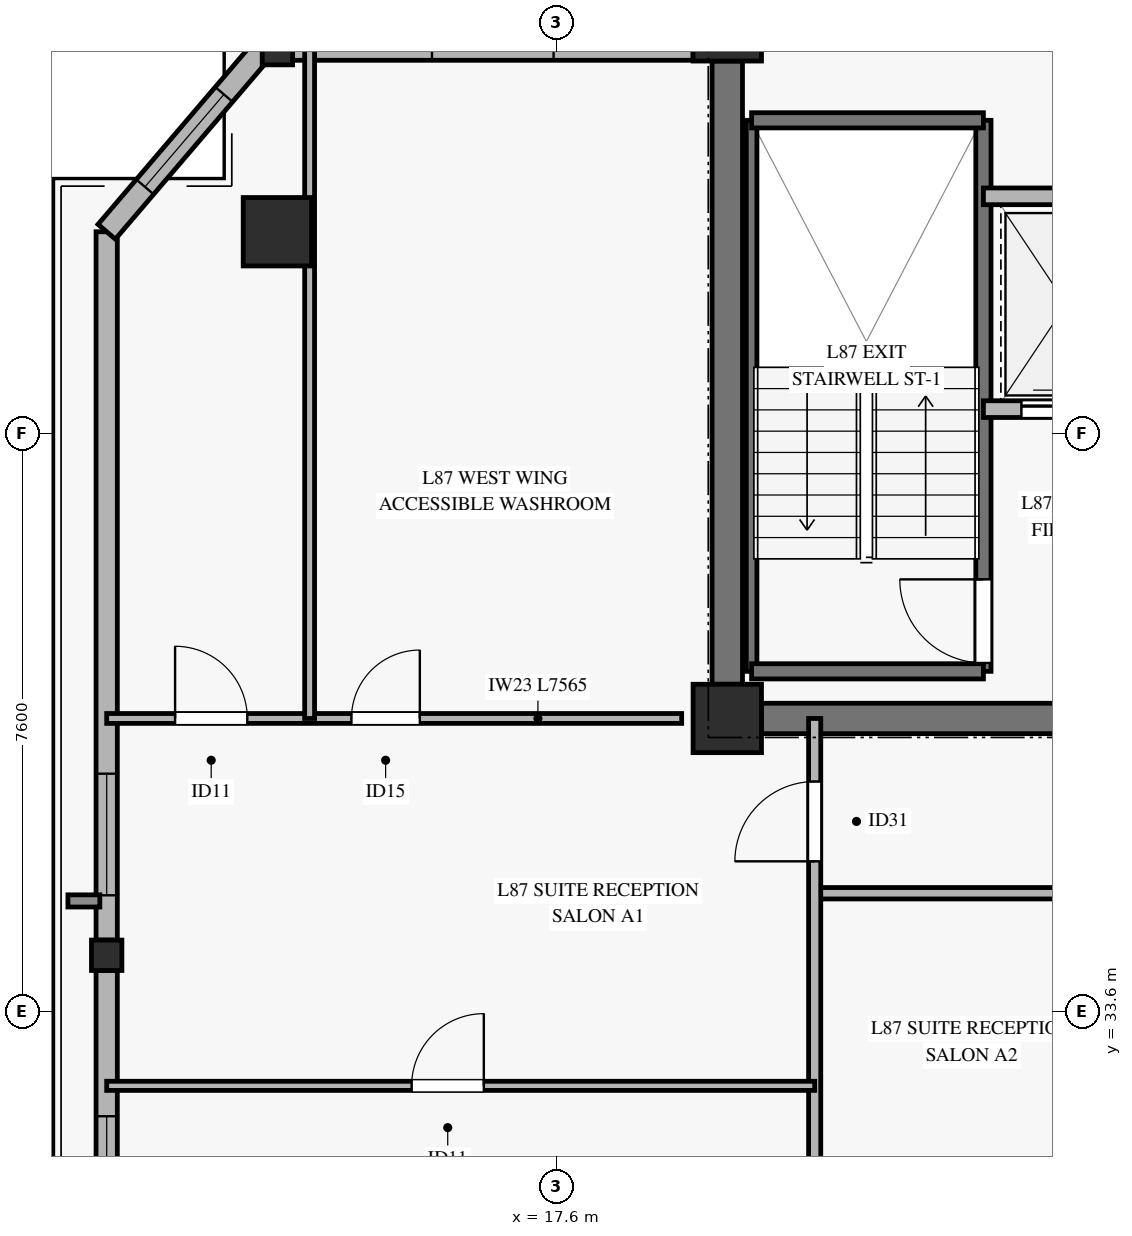
"""IFC4 building model, lengths in metres.
Left out: names, types, materials, properties, quantities, classifications, styles, units other than length and angle.
Written with IfcOpenShell. Run it as: python <this file> out.ifc"""

import sys

from ifc_helpers import new_model, si_unit, direction, frame, frame_2d, origin, origin_2d, place, context, subcontext, project, spatial, rectangle, hollow_rectangle, extrude, source, transform, mapped, element, fill, save


model = new_model("IFC4")
c1 = context("Model", 3, precision=1e-05, world=origin(), true_north=direction((0.0, 1.0)))
c2 = subcontext(c1, "Body", "Model", "MODEL_VIEW")
j1 = project(units=[si_unit("LENGTHUNIT", "METRE"), si_unit("PLANEANGLEUNIT", "RADIAN")], contexts=[c1])
p1 = place(None, origin())
s1 = spatial("IfcSite", under=j1, at=p1, CompositionType="ELEMENT")
p2 = place(p1, origin())
s2 = spatial("IfcBuilding", under=s1, at=p2, CompositionType="ELEMENT")
p3 = place(p2, frame((0.0, 0.0, 335.7)))
s3 = spatial("IfcBuildingStorey", under=s2, at=p3, CompositionType="ELEMENT", Elevation=335.7)
m1 = source(origin(), c2, "Body", "SweptSolid", [
    extrude(rectangle(XDim=0.9, YDim=0.9, at=origin_2d()), origin(), (0.0, 0.0, 1.0), 3.185),
])
for number, where, z_axis, x_axis in (
    (1, (19.85, 37.45, 0.0), (0.0, 0.0, 1.0), (1.0, 0.0, 0.0)),
    (2, (19.85, 46.55, 0.0), (0.0, 0.0, 1.0), (1.0, 0.0, 0.0)),
):
    element("IfcColumn", number, at=place(p3, frame(where, z_axis=z_axis, x_axis=x_axis)), inside=s3, PredefinedType="PILASTER", context=c2, shape_type="MappedRepresentation", body=[
        mapped(m1, transform((0.0, 0.0, 0.0), x_axis=(1.0, 0.0, 0.0), y_axis=(0.0, 1.0, 0.0), z_axis=(0.0, 0.0, 1.0), scale=1.0)),
    ])
p4 = place(p3, frame((20.3, 37.45, 0.0), z_axis=(0.0, 0.0, 1.0), x_axis=(1.0, 0.0, 0.0)))
e3 = element("IfcWall", 3, at=p4, inside=s3, PredefinedType="SHEAR", context=c2, shape_type="SweptSolid", body=[
    extrude(rectangle(XDim=10.05, YDim=0.4, at=frame_2d((5.025, 0.0))), origin(), (0.0, 0.0, 1.0), 3.185),
])
p5 = place(p4, frame((4.25, 0.0, 0.0)))
e4 = element("IfcOpeningElement", 4, at=p5, cuts=e3, PredefinedType="OPENING", context=c2, shape_type="SweptSolid", body=[
    extrude(rectangle(XDim=1.2, YDim=2.15, at=frame_2d((0.6, 1.075))), frame((0.0, 0.21, 0.0), z_axis=(0.0, -1.0, 0.0), x_axis=(1.0, 0.0, 0.0)), (0.0, 0.0, 1.0), 0.42),
])
p6 = place(p3, frame((19.85, 37.9, 0.0), z_axis=(0.0, 0.0, 1.0), x_axis=(0.0, 1.0, 0.0)))
e5 = element("IfcWall", 5, at=p6, inside=s3, PredefinedType="SHEAR", context=c2, shape_type="SweptSolid", body=[
    extrude(rectangle(XDim=8.2, YDim=0.4, at=frame_2d((4.1, 0.0))), origin(), (0.0, 0.0, 1.0), 3.185),
])
m2 = source(origin(), c2, "Body", "SweptSolid", [
    extrude(hollow_rectangle(XDim=0.9, YDim=0.9, WallThickness=0.04, at=origin_2d()), origin(), (0.0, 0.0, 1.0), 3.185),
])
p7 = place(p3, frame((13.931, 43.854, 0.0), z_axis=(0.0, 0.0, 1.0), x_axis=(1.0, 0.0, 0.0)))
e6 = element("IfcColumn", 6, at=p7, inside=s3, PredefinedType="COLUMN", context=c2, shape_type="MappedRepresentation", body=[
    mapped(m2, transform((0.0, 0.0, 0.0), x_axis=(1.0, 0.0, 0.0), y_axis=(0.0, 1.0, 0.0), z_axis=(0.0, 0.0, 1.0), scale=1.0)),
])
m3 = source(origin(), c2, "Body", "SweptSolid", [
    extrude(hollow_rectangle(XDim=0.4, YDim=0.4, WallThickness=0.02, at=origin_2d()), origin(), (0.0, 0.0, 1.0), 3.185),
])
for number, where, z_axis, x_axis in (
    (7, (11.685, 34.334, 0.0), (0.0, 0.0, 1.0), (1.0, 0.0, 0.0)),
    (8, (13.931, 46.25, 0.0), (0.0, 0.0, 1.0), (1.0, 0.0, 0.0)),
):
    element("IfcColumn", number, at=place(p3, frame(where, z_axis=z_axis, x_axis=x_axis)), inside=s3, PredefinedType="COLUMN", context=c2, shape_type="MappedRepresentation", body=[
        mapped(m3, transform((0.0, 0.0, 0.0), x_axis=(1.0, 0.0, 0.0), y_axis=(0.0, 1.0, 0.0), z_axis=(0.0, 0.0, 1.0), scale=1.0)),
    ])
p8 = place(p3, frame((11.685, 24.814, 0.0), z_axis=(0.0, 0.0, 1.0), x_axis=(0.0, 1.0, 0.0)))
e9 = element("IfcWall", 9, at=p8, inside=s3, PredefinedType="SOLIDWALL", context=c2, shape_type="SweptSolid", body=[
    extrude(rectangle(XDim=9.32, YDim=0.28, at=frame_2d((4.66, 0.0))), origin(), (0.0, 0.0, 1.0), 2.815),
])
p9 = place(p8, frame((0.604, 0.0, 0.45)))
e10 = element("IfcOpeningElement", 10, at=p9, cuts=e9, PredefinedType="OPENING", context=c2, shape_type="SweptSolid", body=[
    extrude(rectangle(XDim=1.6, YDim=2.0, at=frame_2d((0.8, 1.0))), frame((0.0, 0.15, 0.0), z_axis=(0.0, -1.0, 0.0), x_axis=(1.0, 0.0, 0.0)), (0.0, 0.0, 1.0), 0.3),
])
p10 = place(p8, frame((5.202, 0.0, 0.45)))
e11 = element("IfcOpeningElement", 11, at=p10, cuts=e9, PredefinedType="OPENING", context=c2, shape_type="SweptSolid", body=[
    extrude(rectangle(XDim=2.2, YDim=2.1, at=frame_2d((1.1, 1.05))), frame((0.0, 0.15, 0.0), z_axis=(0.0, -1.0, 0.0), x_axis=(1.0, 0.0, 0.0)), (0.0, 0.0, 1.0), 0.3),
])
p11 = place(p3, frame((11.685, 34.534, 0.0), z_axis=(0.0, 0.0, 1.0), x_axis=(0.0, 1.0, 0.0)))
e12 = element("IfcWall", 12, at=p11, inside=s3, PredefinedType="SOLIDWALL", context=c2, shape_type="SweptSolid", body=[
    extrude(rectangle(XDim=9.32, YDim=0.28, at=frame_2d((4.66, 0.0))), origin(), (0.0, 0.0, 1.0), 2.815),
])
p12 = place(p11, frame((0.589, 0.0, 0.45)))
e13 = element("IfcOpeningElement", 13, at=p12, cuts=e12, PredefinedType="OPENING", context=c2, shape_type="SweptSolid", body=[
    extrude(rectangle(XDim=1.6, YDim=2.0, at=frame_2d((0.8, 1.0))), frame((0.0, 0.15, 0.0), z_axis=(0.0, -1.0, 0.0), x_axis=(1.0, 0.0, 0.0)), (0.0, 0.0, 1.0), 0.3),
])
p13 = place(p3, frame((14.131, 46.25, 0.0), z_axis=(0.0, 0.0, 1.0), x_axis=(1.0, 0.0, 0.0)))
e14 = element("IfcWall", 14, at=p13, inside=s3, PredefinedType="SOLIDWALL", context=c2, shape_type="SweptSolid", body=[
    extrude(rectangle(XDim=5.269, YDim=0.28, at=frame_2d((2.634, 0.0))), origin(), (0.0, 0.0, 1.0), 2.815),
])
p14 = place(p13, frame((1.834, 0.0, 0.45)))
e15 = element("IfcOpeningElement", 15, at=p14, cuts=e14, PredefinedType="OPENING", context=c2, shape_type="SweptSolid", body=[
    extrude(rectangle(XDim=1.6, YDim=2.0, at=frame_2d((0.8, 1.0))), frame((0.0, 0.15, 0.0), z_axis=(0.0, -1.0, 0.0), x_axis=(1.0, 0.0, 0.0)), (0.0, 0.0, 1.0), 0.3),
])
p15 = place(p3, frame((13.731, 46.25, 0.0), z_axis=(0.0, 0.0, 1.0), x_axis=(-0.64936076944, -0.760480500153, 0.0)))
e16 = element("IfcWall", 16, at=p15, inside=s3, PredefinedType="SOLIDWALL", context=c2, shape_type="SweptSolid", body=[
    extrude(rectangle(XDim=3.151, YDim=0.3, at=frame_2d((1.575, 0.0))), origin(), (0.0, 0.0, 1.0), 2.815),
])
p16 = place(p15, frame((0.775, 0.0, 0.45)))
e17 = element("IfcOpeningElement", 17, at=p16, cuts=e16, PredefinedType="OPENING", context=c2, shape_type="SweptSolid", body=[
    extrude(rectangle(XDim=1.6, YDim=2.0, at=frame_2d((0.8, 1.0))), frame((0.0, 0.16, 0.0), z_axis=(0.0, -1.0, 0.0), x_axis=(1.0, 0.0, 0.0)), (0.0, 0.0, 1.0), 0.32),
])
p17 = place(p3, frame((20.17, 38.07, 0.0), z_axis=(0.0, 0.0, 1.0), x_axis=(0.0, 1.0, 0.0)))
e18 = element("IfcWall", 18, at=p17, inside=s3, PredefinedType="SOLIDWALL", context=c2, shape_type="SweptSolid", body=[
    extrude(rectangle(XDim=7.25, YDim=0.14, at=frame_2d((3.625, 0.0))), origin(), (0.0, 0.0, 1.0), 3.4),
])
p18 = place(p3, frame((23.22, 38.07, 0.0), z_axis=(0.0, 0.0, 1.0), x_axis=(0.0, 1.0, 0.0)))
e19 = element("IfcWall", 19, at=p18, inside=s3, PredefinedType="SOLIDWALL", context=c2, shape_type="SweptSolid", body=[
    extrude(rectangle(XDim=7.25, YDim=0.2, at=frame_2d((3.625, 0.0))), origin(), (0.0, 0.0, 1.0), 3.4),
])
p19 = place(p18, frame((0.11, 0.0, 0.0)))
e20 = element("IfcOpeningElement", 20, at=p19, cuts=e19, PredefinedType="OPENING", context=c2, shape_type="SweptSolid", body=[
    extrude(rectangle(XDim=1.1, YDim=2.15, at=frame_2d((0.55, 1.075))), frame((0.0, 0.11, 0.0), z_axis=(0.0, -1.0, 0.0), x_axis=(1.0, 0.0, 0.0)), (0.0, 0.0, 1.0), 0.22),
])
for number, where, z_axis, x_axis in (
    (21, (20.17, 45.32, 0.0), (0.0, 0.0, 1.0), (1.0, 0.0, 0.0)),
    (22, (20.17, 38.07, 0.0), (0.0, 0.0, 1.0), (1.0, 0.0, 0.0)),
):
    element("IfcWall", number, at=place(p3, frame(where, z_axis=z_axis, x_axis=x_axis)), inside=s3, PredefinedType="SOLIDWALL", context=c2, shape_type="SweptSolid", body=[
        extrude(rectangle(XDim=3.05, YDim=0.2, at=frame_2d((1.525, 0.0))), origin(), (0.0, 0.0, 1.0), 3.4),
    ])
p20 = place(p3, frame((23.22, 41.52, 0.0), z_axis=(0.0, 0.0, 1.0), x_axis=(1.0, 0.0, 0.0)))
e23 = element("IfcWall", 23, at=p20, inside=s3, PredefinedType="SOLIDWALL", context=c2, shape_type="SweptSolid", body=[
    extrude(rectangle(XDim=3.92, YDim=0.22, at=frame_2d((1.96, 0.0))), origin(), (0.0, 0.0, 1.0), 3.185),
])
p21 = place(p20, frame((0.5, 0.0, 0.0)))
e24 = element("IfcOpeningElement", 24, at=p21, cuts=e23, PredefinedType="OPENING", context=c2, shape_type="SweptSolid", body=[
    extrude(rectangle(XDim=1.1, YDim=2.2, at=frame_2d((0.55, 1.1))), frame((0.0, 0.12, 0.0), z_axis=(0.0, -1.0, 0.0), x_axis=(1.0, 0.0, 0.0)), (0.0, 0.0, 1.0), 0.24),
])
p22 = place(p20, frame((2.4, 0.0, 0.0)))
e25 = element("IfcOpeningElement", 25, at=p22, cuts=e23, PredefinedType="OPENING", context=c2, shape_type="SweptSolid", body=[
    extrude(rectangle(XDim=1.1, YDim=2.2, at=frame_2d((0.55, 1.1))), frame((0.0, 0.12, 0.0), z_axis=(0.0, -1.0, 0.0), x_axis=(1.0, 0.0, 0.0)), (0.0, 0.0, 1.0), 0.24),
])
p23 = place(p3, frame((23.22, 44.32, 0.0), z_axis=(0.0, 0.0, 1.0), x_axis=(1.0, 0.0, 0.0)))
e26 = element("IfcWall", 26, at=p23, inside=s3, PredefinedType="SOLIDWALL", context=c2, shape_type="SweptSolid", body=[
    extrude(rectangle(XDim=3.92, YDim=0.22, at=frame_2d((1.96, 0.0))), origin(), (0.0, 0.0, 1.0), 3.185),
])
p24 = place(p3, frame((21.0, 35.15, 0.0), z_axis=(0.0, 0.0, 1.0), x_axis=(1.0, 0.0, 0.0)))
e27 = element("IfcWall", 27, at=p24, inside=s3, PredefinedType="PARTITIONING", context=c2, shape_type="SweptSolid", body=[
    extrude(rectangle(XDim=23.2, YDim=0.15, at=frame_2d((11.6, 0.0))), origin(), (0.0, 0.0, 1.0), 2.47),
])
p25 = place(p24, frame((4.577, 0.0, 0.0)))
e28 = element("IfcOpeningElement", 28, at=p25, cuts=e27, PredefinedType="OPENING", context=c2, shape_type="SweptSolid", body=[
    extrude(rectangle(XDim=1.05, YDim=2.15, at=frame_2d((0.525, 1.075))), frame((0.0, 0.085, 0.0), z_axis=(0.0, -1.0, 0.0), x_axis=(1.0, 0.0, 0.0)), (0.0, 0.0, 1.0), 0.17),
])
p26 = place(p24, frame((16.177, 0.0, 0.0)))
e29 = element("IfcOpeningElement", 29, at=p26, cuts=e27, PredefinedType="OPENING", context=c2, shape_type="SweptSolid", body=[
    extrude(rectangle(XDim=1.05, YDim=2.15, at=frame_2d((0.525, 1.075))), frame((0.0, 0.085, 0.0), z_axis=(0.0, -1.0, 0.0), x_axis=(1.0, 0.0, 0.0)), (0.0, 0.0, 1.0), 0.17),
])
p27 = place(p3, frame((21.0, 22.568, 0.0), z_axis=(0.0, 0.0, 1.0), x_axis=(0.0, 1.0, 0.0)))
e30 = element("IfcWall", 30, at=p27, inside=s3, PredefinedType="PARTITIONING", context=c2, shape_type="SweptSolid", body=[
    extrude(rectangle(XDim=14.882, YDim=0.16, at=frame_2d((7.441, 0.0))), origin(), (0.0, 0.0, 1.0), 2.77),
])
p28 = place(p27, frame((13.002, 0.0, 0.0)))
e31 = element("IfcOpeningElement", 31, at=p28, cuts=e30, PredefinedType="OPENING", context=c2, shape_type="SweptSolid", body=[
    extrude(rectangle(XDim=1.05, YDim=2.15, at=frame_2d((0.525, 1.075))), frame((0.0, 0.09, 0.0), z_axis=(0.0, -1.0, 0.0), x_axis=(1.0, 0.0, 0.0)), (0.0, 0.0, 1.0), 0.18),
])
p29 = place(p3, frame((11.685, 32.616, 0.0), z_axis=(0.0, 0.0, 1.0), x_axis=(1.0, 0.0, 0.0)))
e32 = element("IfcWall", 32, at=p29, inside=s3, PredefinedType="PARTITIONING", context=c2, shape_type="SweptSolid", body=[
    extrude(rectangle(XDim=9.315, YDim=0.12, at=frame_2d((4.657, 0.0))), origin(), (0.0, 0.0, 1.0), 2.47),
])
p30 = place(p29, frame((4.012, 0.0, 0.0)))
e33 = element("IfcOpeningElement", 33, at=p30, cuts=e32, PredefinedType="OPENING", context=c2, shape_type="SweptSolid", body=[
    extrude(rectangle(XDim=0.95, YDim=2.1, at=frame_2d((0.475, 1.05))), frame((0.0, 0.07, 0.0), z_axis=(0.0, -1.0, 0.0), x_axis=(1.0, 0.0, 0.0)), (0.0, 0.0, 1.0), 0.14),
])
p31 = place(p3, frame((11.685, 37.45, 0.0), z_axis=(0.0, 0.0, 1.0), x_axis=(1.0, 0.0, 0.0)))
e34 = element("IfcWall", 34, at=p31, inside=s3, PredefinedType="PARTITIONING", context=c2, shape_type="SweptSolid", body=[
    extrude(rectangle(XDim=7.565, YDim=0.13, at=frame_2d((3.782, 0.0))), origin(), (0.0, 0.0, 1.0), 2.82),
])
p32 = place(p31, frame((0.9, 0.0, 0.0)))
e35 = element("IfcOpeningElement", 35, at=p32, cuts=e34, PredefinedType="OPENING", context=c2, shape_type="SweptSolid", body=[
    extrude(rectangle(XDim=0.95, YDim=2.1, at=frame_2d((0.475, 1.05))), frame((0.0, 0.075, 0.0), z_axis=(0.0, -1.0, 0.0), x_axis=(1.0, 0.0, 0.0)), (0.0, 0.0, 1.0), 0.15),
])
p33 = place(p31, frame((3.22, 0.0, 0.0)))
e36 = element("IfcOpeningElement", 36, at=p33, cuts=e34, PredefinedType="OPENING", context=c2, shape_type="SweptSolid", body=[
    extrude(rectangle(XDim=0.9, YDim=2.1, at=frame_2d((0.45, 1.05))), frame((0.0, 0.075, 0.0), z_axis=(0.0, -1.0, 0.0), x_axis=(1.0, 0.0, 0.0)), (0.0, 0.0, 1.0), 0.15),
])
p34 = place(p3, frame((14.355, 37.45, 0.0), z_axis=(0.0, 0.0, 1.0), x_axis=(0.0, 1.0, 0.0)))
e37 = element("IfcWall", 37, at=p34, inside=s3, PredefinedType="PARTITIONING", context=c2, shape_type="SweptSolid", body=[
    extrude(rectangle(XDim=8.8, YDim=0.13, at=frame_2d((4.4, 0.0))), origin(), (0.0, 0.0, 1.0), 3.185),
])
m4 = source(origin(), c2, "Body", "SweptSolid", [
    extrude(rectangle(XDim=2.2, YDim=2.1, at=frame_2d((1.1, 1.05))), frame((0.0, 0.03, 0.0), z_axis=(0.0, -1.0, 0.0), x_axis=(1.0, 0.0, 0.0)), (0.0, 0.0, 1.0), 0.06),
])
p35 = place(p10, origin())
e38 = element("IfcWindow", 38, at=p35, inside=s3, PartitioningType="SINGLE_PANEL", PredefinedType="WINDOW", context=c2, shape_type="MappedRepresentation", body=[
    mapped(m4, transform((0.0, 0.0, 0.0), x_axis=(1.0, 0.0, 0.0), y_axis=(0.0, 1.0, 0.0), z_axis=(0.0, 0.0, 1.0), scale=1.0)),
])
fill(e11, e38)
m5 = source(origin(), c2, "Body", "SweptSolid", [
    extrude(rectangle(XDim=1.6, YDim=2.0, at=frame_2d((0.8, 1.0))), frame((0.0, 0.03, 0.0), z_axis=(0.0, -1.0, 0.0), x_axis=(1.0, 0.0, 0.0)), (0.0, 0.0, 1.0), 0.06),
])
p36 = place(p12, origin())
e39 = element("IfcWindow", 39, at=p36, inside=s3, PartitioningType="SINGLE_PANEL", PredefinedType="WINDOW", context=c2, shape_type="MappedRepresentation", body=[
    mapped(m5, transform((0.0, 0.0, 0.0), x_axis=(1.0, 0.0, 0.0), y_axis=(0.0, 1.0, 0.0), z_axis=(0.0, 0.0, 1.0), scale=1.0)),
])
fill(e13, e39)
p37 = place(p16, origin())
e40 = element("IfcWindow", 40, at=p37, inside=s3, PartitioningType="SINGLE_PANEL", PredefinedType="WINDOW", context=c2, shape_type="MappedRepresentation", body=[
    mapped(m5, transform((0.0, 0.0, 0.0), x_axis=(1.0, 0.0, 0.0), y_axis=(0.0, 1.0, 0.0), z_axis=(0.0, 0.0, 1.0), scale=1.0)),
])
fill(e17, e40)
m6 = source(origin(), c2, "Body", "SweptSolid", [
    extrude(rectangle(XDim=1.1, YDim=2.15, at=frame_2d((0.55, 1.075))), frame((0.0, 0.025, 0.0), z_axis=(0.0, -1.0, 0.0), x_axis=(1.0, 0.0, 0.0)), (0.0, 0.0, 1.0), 0.05),
])
p38 = place(p19, origin())
e41 = element("IfcDoor", 41, at=p38, inside=s3, OperationType="SINGLE_SWING_RIGHT", PredefinedType="DOOR", context=c2, shape_type="MappedRepresentation", body=[
    mapped(m6, transform((0.0, 0.0, 0.0), x_axis=(1.0, 0.0, 0.0), y_axis=(0.0, 1.0, 0.0), z_axis=(0.0, 0.0, 1.0), scale=1.0)),
])
fill(e20, e41)
m7 = source(origin(), c2, "Body", "SweptSolid", [
    extrude(rectangle(XDim=1.1, YDim=2.2, at=frame_2d((0.55, 1.1))), frame((0.0, 0.025, 0.0), z_axis=(0.0, -1.0, 0.0), x_axis=(1.0, 0.0, 0.0)), (0.0, 0.0, 1.0), 0.05),
])
p39 = place(p21, origin())
e42 = element("IfcDoor", 42, at=p39, inside=s3, OperationType="SLIDING_TO_LEFT", PredefinedType="DOOR", context=c2, shape_type="MappedRepresentation", body=[
    mapped(m7, transform((0.0, 0.0, 0.0), x_axis=(1.0, 0.0, 0.0), y_axis=(0.0, 1.0, 0.0), z_axis=(0.0, 0.0, 1.0), scale=1.0)),
])
fill(e24, e42)
m8 = source(origin(), c2, "Body", "SweptSolid", [
    extrude(rectangle(XDim=1.05, YDim=2.15, at=frame_2d((0.525, 1.075))), frame((0.0, 0.025, 0.0), z_axis=(0.0, -1.0, 0.0), x_axis=(1.0, 0.0, 0.0)), (0.0, 0.0, 1.0), 0.05),
])
p40 = place(p28, origin())
e43 = element("IfcDoor", 43, at=p40, inside=s3, OperationType="SINGLE_SWING_LEFT", PredefinedType="DOOR", context=c2, shape_type="MappedRepresentation", body=[
    mapped(m8, transform((0.0, 0.0, 0.0), x_axis=(1.0, 0.0, 0.0), y_axis=(0.0, 1.0, 0.0), z_axis=(0.0, 0.0, 1.0), scale=1.0)),
])
fill(e31, e43)
m9 = source(origin(), c2, "Body", "SweptSolid", [
    extrude(rectangle(XDim=0.95, YDim=2.1, at=frame_2d((0.475, 1.05))), frame((0.0, 0.025, 0.0), z_axis=(0.0, -1.0, 0.0), x_axis=(1.0, 0.0, 0.0)), (0.0, 0.0, 1.0), 0.05),
])
p41 = place(p30, origin())
e44 = element("IfcDoor", 44, at=p41, inside=s3, OperationType="SINGLE_SWING_RIGHT", PredefinedType="DOOR", context=c2, shape_type="MappedRepresentation", body=[
    mapped(m9, transform((0.0, 0.0, 0.0), x_axis=(1.0, 0.0, 0.0), y_axis=(0.0, 1.0, 0.0), z_axis=(0.0, 0.0, 1.0), scale=1.0)),
])
fill(e33, e44)
p42 = place(p32, origin())
e45 = element("IfcDoor", 45, at=p42, inside=s3, OperationType="SINGLE_SWING_LEFT", PredefinedType="DOOR", context=c2, shape_type="MappedRepresentation", body=[
    mapped(m9, transform((0.0, 0.0, 0.0), x_axis=(1.0, 0.0, 0.0), y_axis=(0.0, 1.0, 0.0), z_axis=(0.0, 0.0, 1.0), scale=1.0)),
])
fill(e35, e45)
m10 = source(origin(), c2, "Body", "SweptSolid", [
    extrude(rectangle(XDim=0.9, YDim=2.1, at=frame_2d((0.45, 1.05))), frame((0.0, 0.025, 0.0), z_axis=(0.0, -1.0, 0.0), x_axis=(1.0, 0.0, 0.0)), (0.0, 0.0, 1.0), 0.05),
])
p43 = place(p33, origin())
e46 = element("IfcDoor", 46, at=p43, inside=s3, OperationType="SINGLE_SWING_RIGHT", PredefinedType="DOOR", context=c2, shape_type="MappedRepresentation", body=[
    mapped(m10, transform((0.0, 0.0, 0.0), x_axis=(1.0, 0.0, 0.0), y_axis=(0.0, 1.0, 0.0), z_axis=(0.0, 0.0, 1.0), scale=1.0)),
])
fill(e36, e46)
save(model, sys.argv[1])
